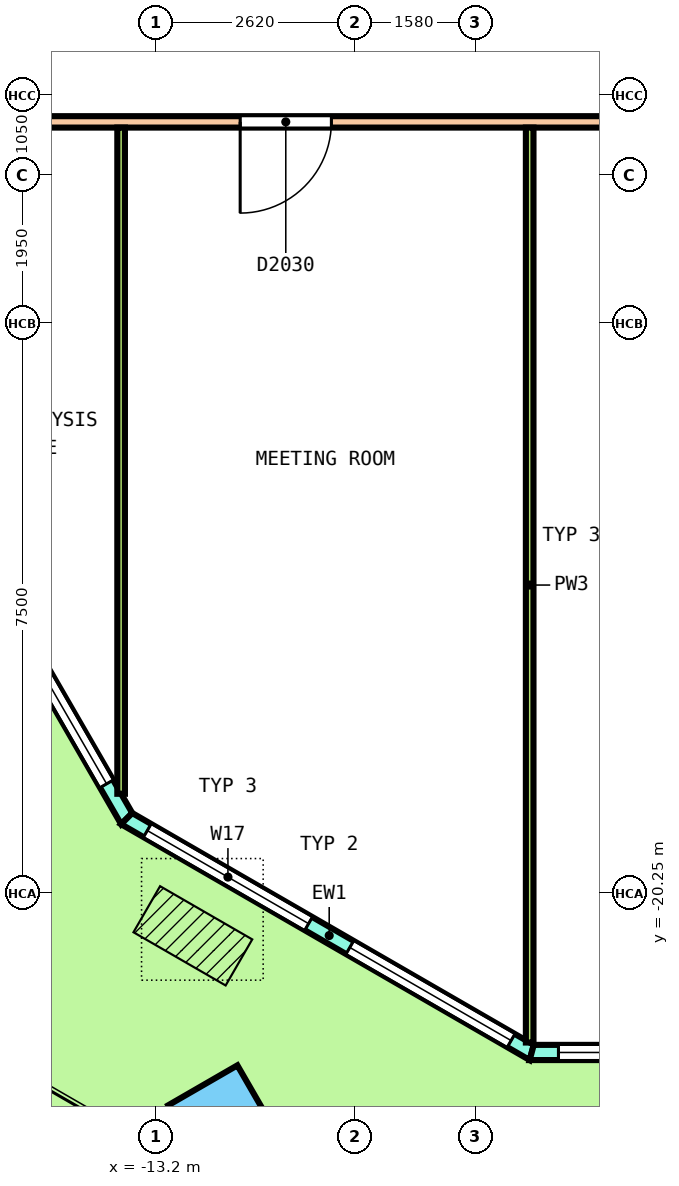
"""IFC4 building model, lengths in metres.
Left out: names, types, materials, properties, quantities, classifications, styles, units other than length and angle.
Written with IfcOpenShell. Run it as: python <this file> out.ifc"""

import sys

from ifc_helpers import new_model, si_unit, direction, frame, frame_2d, origin, origin_2d, place, context, subcontext, project, spatial, polyline, rectangle, outline, extrude, element, fill, save


model = new_model("IFC4")
c1 = context("Model", 3, precision=1e-05, world=origin(), true_north=direction((0.0, 1.0)))
c2 = subcontext(c1, "Body", "Model", "MODEL_VIEW")
j1 = project(units=[si_unit("LENGTHUNIT", "METRE"), si_unit("PLANEANGLEUNIT", "RADIAN")], contexts=[c1])
p1 = place(None, origin())
s1 = spatial("IfcSite", under=j1, at=p1, CompositionType="ELEMENT")
p2 = place(p1, origin())
s2 = spatial("IfcBuilding", under=s1, at=p2, CompositionType="ELEMENT")
p3 = place(p2, frame((0.0, 0.0, 241.4)))
s3 = spatial("IfcBuildingStorey", under=s2, at=p3, CompositionType="ELEMENT", Elevation=241.4)
p4 = place(p3, frame((-12.323, -23.229, 0.0), z_axis=(0.018180813073, -0.031348534306, 0.999343147989), x_axis=(0.866776681622, -0.497708117994, -0.031381737993)))
e1 = element("IfcColumn", 1, at=p4, inside=s3, PredefinedType="COLUMN", context=c2, shape_type="SweptSolid", body=[
    extrude(rectangle(XDim=1.05, YDim=1.05, at=origin_2d()), origin(), (0.0, 0.0, 1.0), 3.653),
])
p5 = place(p3, frame((-23.479, -2.134, 0.0), z_axis=(0.0, 0.0, 1.0), x_axis=(0.500004117472, -0.866023026548, 0.0)))
e2 = element("IfcWall", 2, at=p5, inside=s3, PredefinedType="SOLIDWALL", context=c2, shape_type="SweptSolid", body=[
    extrude(outline(polyline([(-0.027, -0.1), (1.017, -0.1), (2.061, -0.1), (3.105, -0.1), (4.149, -0.1), (5.193, -0.1), (6.237, -0.1), (7.281, -0.1), (8.325, -0.1), (9.369, -0.1), (10.414, -0.1), (11.458, -0.1), (12.501, -0.1), (13.546, -0.1), (14.59, -0.1), (15.634, -0.1), (16.678, -0.1), (17.722, -0.1), (18.766, -0.1), (19.81, -0.1), (19.756, 0.1), (18.718, 0.1), (17.679, 0.1), (16.641, 0.1), (15.603, 0.1), (14.564, 0.1), (13.526, 0.1), (12.488, 0.1), (11.449, 0.1), (10.411, 0.1), (9.372, 0.1), (8.334, 0.1), (7.295, 0.1), (6.257, 0.1), (5.219, 0.1), (4.18, 0.1), (3.142, 0.1), (2.104, 0.1), (1.065, 0.1), (0.027, 0.1), (-0.027, -0.1)])), origin(), (0.0, 0.0, 1.0), 3.7),
])
p6 = place(p5, frame((0.528, 0.0, 0.1)))
e3 = element("IfcOpeningElement", 3, at=p6, cuts=e2, PredefinedType="OPENING", context=c2, shape_type="SweptSolid", body=[
    extrude(rectangle(XDim=2.9, YDim=2.65, at=frame_2d((1.45, 1.325))), frame((0.0, 0.11, 0.0), z_axis=(0.0, -1.0, 0.0), x_axis=(1.0, 0.0, 0.0)), (0.0, 0.0, 1.0), 0.22),
])
p7 = place(p5, frame((4.485, 0.0, 0.1)))
e4 = element("IfcOpeningElement", 4, at=p7, cuts=e2, PredefinedType="OPENING", context=c2, shape_type="SweptSolid", body=[
    extrude(rectangle(XDim=2.9, YDim=2.65, at=frame_2d((1.45, 1.325))), frame((0.0, 0.11, 0.0), z_axis=(0.0, -1.0, 0.0), x_axis=(1.0, 0.0, 0.0)), (0.0, 0.0, 1.0), 0.22),
])
p8 = place(p5, frame((8.991, 0.0, 0.0)))
e5 = element("IfcOpeningElement", 5, at=p8, cuts=e2, PredefinedType="OPENING", context=c2, shape_type="SweptSolid", body=[
    extrude(rectangle(XDim=1.8, YDim=2.4, at=frame_2d((0.9, 1.2))), frame((0.0, 0.11, 0.0), z_axis=(0.0, -1.0, 0.0), x_axis=(1.0, 0.0, 0.0)), (0.0, 0.0, 1.0), 0.22),
])
p9 = place(p5, frame((8.991, 0.0, 2.55)))
e6 = element("IfcOpeningElement", 6, at=p9, cuts=e2, PredefinedType="OPENING", context=c2, shape_type="SweptSolid", body=[
    extrude(rectangle(XDim=1.8, YDim=0.2, at=frame_2d((0.9, 0.1))), frame((0.0, 0.11, 0.0), z_axis=(0.0, -1.0, 0.0), x_axis=(1.0, 0.0, 0.0)), (0.0, 0.0, 1.0), 0.22),
])
p10 = place(p5, frame((12.398, 0.0, 0.1)))
e7 = element("IfcOpeningElement", 7, at=p10, cuts=e2, PredefinedType="OPENING", context=c2, shape_type="SweptSolid", body=[
    extrude(rectangle(XDim=2.9, YDim=2.65, at=frame_2d((1.45, 1.325))), frame((0.0, 0.11, 0.0), z_axis=(0.0, -1.0, 0.0), x_axis=(1.0, 0.0, 0.0)), (0.0, 0.0, 1.0), 0.22),
])
p11 = place(p5, frame((16.355, 0.0, 0.1)))
e8 = element("IfcOpeningElement", 8, at=p11, cuts=e2, PredefinedType="OPENING", context=c2, shape_type="SweptSolid", body=[
    extrude(rectangle(XDim=2.9, YDim=2.65, at=frame_2d((1.45, 1.325))), frame((0.0, 0.11, 0.0), z_axis=(0.0, -1.0, 0.0), x_axis=(1.0, 0.0, 0.0)), (0.0, 0.0, 1.0), 0.22),
])
p12 = place(p3, frame((-13.587, -19.266, 0.0), z_axis=(0.0, 0.0, 1.0), x_axis=(0.866029647142, -0.499992650217, 0.0)))
e9 = element("IfcWall", 9, at=p12, inside=s3, PredefinedType="SOLIDWALL", context=c2, shape_type="SweptSolid", body=[
    extrude(outline(polyline([(-0.027, -0.1), (1.008, -0.1), (2.042, -0.1), (3.076, -0.1), (4.111, -0.1), (5.145, -0.1), (6.18, -0.1), (6.126, 0.1), (5.109, 0.1), (4.093, 0.1), (3.076, 0.1), (2.06, 0.1), (1.043, 0.1), (0.027, 0.1), (-0.027, -0.1)])), origin(), (0.0, 0.0, 1.0), 3.7),
])
p13 = place(p12, frame((0.313, 0.0, 0.1)))
e10 = element("IfcOpeningElement", 10, at=p13, cuts=e9, PredefinedType="OPENING", context=c2, shape_type="SweptSolid", body=[
    extrude(rectangle(XDim=2.45, YDim=2.65, at=frame_2d((1.225, 1.325))), frame((0.0, 0.11, 0.0), z_axis=(0.0, -1.0, 0.0), x_axis=(1.0, 0.0, 0.0)), (0.0, 0.0, 1.0), 0.22),
])
p14 = place(p12, frame((3.39, 0.0, 0.1)))
e11 = element("IfcOpeningElement", 11, at=p14, cuts=e9, PredefinedType="OPENING", context=c2, shape_type="SweptSolid", body=[
    extrude(rectangle(XDim=2.45, YDim=2.65, at=frame_2d((1.225, 1.325))), frame((0.0, 0.11, 0.0), z_axis=(0.0, -1.0, 0.0), x_axis=(1.0, 0.0, 0.0)), (0.0, 0.0, 1.0), 0.22),
])
p15 = place(p3, frame((-8.259, -22.343, 0.0), z_axis=(0.0, 0.0, 1.0), x_axis=(1.0, 0.0, 0.0)))
e12 = element("IfcWall", 12, at=p15, inside=s3, PredefinedType="SOLIDWALL", context=c2, shape_type="SweptSolid", body=[
    extrude(outline(polyline([(-0.027, -0.1), (1.009, -0.1), (2.044, -0.1), (3.08, -0.1), (4.116, -0.1), (5.152, -0.1), (6.187, -0.1), (7.223, -0.1), (8.259, -0.1), (9.294, -0.1), (10.33, -0.1), (11.365, -0.1), (12.401, -0.1), (13.437, -0.1), (14.473, -0.1), (15.508, -0.1), (16.544, -0.1), (16.49, 0.1), (15.461, 0.1), (14.432, 0.1), (13.403, 0.1), (12.375, 0.1), (11.345, 0.1), (10.316, 0.1), (9.288, 0.1), (8.259, 0.1), (7.229, 0.1), (6.201, 0.1), (5.172, 0.1), (4.143, 0.1), (3.114, 0.1), (2.085, 0.1), (1.056, 0.1), (0.027, 0.1), (-0.027, -0.1)])), origin(), (0.0, 0.0, 1.0), 3.7),
])
p16 = place(p15, frame((0.352, 0.0, 0.1)))
e13 = element("IfcOpeningElement", 13, at=p16, cuts=e12, PredefinedType="OPENING", context=c2, shape_type="SweptSolid", body=[
    extrude(rectangle(XDim=2.6, YDim=2.65, at=frame_2d((1.3, 1.325))), frame((0.0, 0.11, 0.0), z_axis=(0.0, -1.0, 0.0), x_axis=(1.0, 0.0, 0.0)), (0.0, 0.0, 1.0), 0.22),
])
p17 = place(p15, frame((3.655, 0.0, 0.1)))
e14 = element("IfcOpeningElement", 14, at=p17, cuts=e12, PredefinedType="OPENING", context=c2, shape_type="SweptSolid", body=[
    extrude(rectangle(XDim=2.6, YDim=2.65, at=frame_2d((1.3, 1.325))), frame((0.0, 0.11, 0.0), z_axis=(0.0, -1.0, 0.0), x_axis=(1.0, 0.0, 0.0)), (0.0, 0.0, 1.0), 0.22),
])
p18 = place(p15, frame((7.359, 0.0, 0.0)))
e15 = element("IfcOpeningElement", 15, at=p18, cuts=e12, PredefinedType="OPENING", context=c2, shape_type="SweptSolid", body=[
    extrude(rectangle(XDim=1.8, YDim=2.4, at=frame_2d((0.9, 1.2))), frame((0.0, 0.11, 0.0), z_axis=(0.0, -1.0, 0.0), x_axis=(1.0, 0.0, 0.0)), (0.0, 0.0, 1.0), 0.22),
])
p19 = place(p15, frame((7.359, 0.0, 2.55)))
e16 = element("IfcOpeningElement", 16, at=p19, cuts=e12, PredefinedType="OPENING", context=c2, shape_type="SweptSolid", body=[
    extrude(rectangle(XDim=1.8, YDim=0.2, at=frame_2d((0.9, 0.1))), frame((0.0, 0.11, 0.0), z_axis=(0.0, -1.0, 0.0), x_axis=(1.0, 0.0, 0.0)), (0.0, 0.0, 1.0), 0.22),
])
p20 = place(p15, frame((10.262, 0.0, 0.1)))
e17 = element("IfcOpeningElement", 17, at=p20, cuts=e12, PredefinedType="OPENING", context=c2, shape_type="SweptSolid", body=[
    extrude(rectangle(XDim=2.6, YDim=2.65, at=frame_2d((1.3, 1.325))), frame((0.0, 0.11, 0.0), z_axis=(0.0, -1.0, 0.0), x_axis=(1.0, 0.0, 0.0)), (0.0, 0.0, 1.0), 0.22),
])
p21 = place(p15, frame((13.565, 0.0, 0.1)))
e18 = element("IfcOpeningElement", 18, at=p21, cuts=e12, PredefinedType="OPENING", context=c2, shape_type="SweptSolid", body=[
    extrude(rectangle(XDim=2.6, YDim=2.65, at=frame_2d((1.3, 1.325))), frame((0.0, 0.11, 0.0), z_axis=(0.0, -1.0, 0.0), x_axis=(1.0, 0.0, 0.0)), (0.0, 0.0, 1.0), 0.22),
])
p22 = place(p3, frame((-15.275, -10.1, 0.0), z_axis=(0.0, 0.0, 1.0), x_axis=(1.0, 0.0, 0.0)))
e19 = element("IfcWall", 19, at=p22, inside=s3, PredefinedType="PARTITIONING", context=c2, shape_type="SweptSolid", body=[
    extrude(rectangle(XDim=30.55, YDim=0.15, at=frame_2d((15.275, 0.0))), origin(), (0.0, 0.0, 1.0), 2.8),
])
p23 = place(p22, frame((3.181, 0.0, 0.0)))
e20 = element("IfcOpeningElement", 20, at=p23, cuts=e19, PredefinedType="OPENING", context=c2, shape_type="SweptSolid", body=[
    extrude(rectangle(XDim=1.2, YDim=2.1, at=frame_2d((0.6, 1.05))), frame((0.0, 0.085, 0.0), z_axis=(0.0, -1.0, 0.0), x_axis=(1.0, 0.0, 0.0)), (0.0, 0.0, 1.0), 0.17),
])
p24 = place(p22, frame((8.522, 0.0, 0.0)))
e21 = element("IfcOpeningElement", 21, at=p24, cuts=e19, PredefinedType="OPENING", context=c2, shape_type="SweptSolid", body=[
    extrude(rectangle(XDim=1.2, YDim=2.1, at=frame_2d((0.6, 1.05))), frame((0.0, 0.085, 0.0), z_axis=(0.0, -1.0, 0.0), x_axis=(1.0, 0.0, 0.0)), (0.0, 0.0, 1.0), 0.17),
])
p25 = place(p22, frame((15.2, 0.0, 0.0)))
e22 = element("IfcOpeningElement", 22, at=p25, cuts=e19, PredefinedType="OPENING", context=c2, shape_type="SweptSolid", body=[
    extrude(rectangle(XDim=1.0, YDim=2.1, at=frame_2d((0.5, 1.05))), frame((0.0, 0.085, 0.0), z_axis=(0.0, -1.0, 0.0), x_axis=(1.0, 0.0, 0.0)), (0.0, 0.0, 1.0), 0.17),
])
p26 = place(p22, frame((23.262, 0.0, 0.0)))
e23 = element("IfcOpeningElement", 23, at=p26, cuts=e19, PredefinedType="OPENING", context=c2, shape_type="SweptSolid", body=[
    extrude(rectangle(XDim=1.2, YDim=2.1, at=frame_2d((0.6, 1.05))), frame((0.0, 0.085, 0.0), z_axis=(0.0, -1.0, 0.0), x_axis=(1.0, 0.0, 0.0)), (0.0, 0.0, 1.0), 0.17),
])
p27 = place(p22, frame((28.493, 0.0, 0.0)))
e24 = element("IfcOpeningElement", 24, at=p27, cuts=e19, PredefinedType="OPENING", context=c2, shape_type="SweptSolid", body=[
    extrude(rectangle(XDim=1.0, YDim=2.1, at=frame_2d((0.5, 1.05))), frame((0.0, 0.085, 0.0), z_axis=(0.0, -1.0, 0.0), x_axis=(1.0, 0.0, 0.0)), (0.0, 0.0, 1.0), 0.17),
])
p28 = place(p3, frame((-13.66, -18.939, 0.0), z_axis=(0.0, 0.0, 1.0), x_axis=(0.0, 1.0, 0.0)))
e25 = element("IfcWall", 25, at=p28, inside=s3, PredefinedType="PARTITIONING", context=c2, shape_type="SweptSolid", body=[
    extrude(rectangle(XDim=8.764, YDim=0.1, at=frame_2d((4.382, 0.0))), origin(), (0.0, 0.0, 1.0), 2.8),
])
p29 = place(p3, frame((-8.285, -22.212, 0.0), z_axis=(0.0, 0.0, 1.0), x_axis=(0.0, 1.0, 0.0)))
e26 = element("IfcWall", 26, at=p29, inside=s3, PredefinedType="PARTITIONING", context=c2, shape_type="SweptSolid", body=[
    extrude(rectangle(XDim=12.037, YDim=0.1, at=frame_2d((6.019, 0.0))), origin(), (0.0, 0.0, 1.0), 2.8),
])
p30 = place(p11, origin())
e27 = element("IfcWindow", 27, at=p30, inside=s3, PartitioningType="SINGLE_PANEL", PredefinedType="WINDOW", context=c2, shape_type="SweptSolid", body=[
    extrude(rectangle(XDim=2.9, YDim=2.65, at=frame_2d((1.45, 1.325))), frame((0.0, 0.03, 0.0), z_axis=(0.0, -1.0, 0.0), x_axis=(1.0, 0.0, 0.0)), (0.0, 0.0, 1.0), 0.06),
])
fill(e8, e27)
p31 = place(p13, origin())
e28 = element("IfcWindow", 28, at=p31, inside=s3, PartitioningType="SINGLE_PANEL", PredefinedType="WINDOW", context=c2, shape_type="SweptSolid", body=[
    extrude(rectangle(XDim=2.45, YDim=2.65, at=frame_2d((1.225, 1.325))), frame((0.0, 0.03, 0.0), z_axis=(0.0, -1.0, 0.0), x_axis=(1.0, 0.0, 0.0)), (0.0, 0.0, 1.0), 0.06),
])
fill(e10, e28)
p32 = place(p14, origin())
e29 = element("IfcWindow", 29, at=p32, inside=s3, PartitioningType="SINGLE_PANEL", PredefinedType="WINDOW", context=c2, shape_type="SweptSolid", body=[
    extrude(rectangle(XDim=2.45, YDim=2.65, at=frame_2d((1.225, 1.325))), frame((0.0, 0.03, 0.0), z_axis=(0.0, -1.0, 0.0), x_axis=(1.0, 0.0, 0.0)), (0.0, 0.0, 1.0), 0.06),
])
fill(e11, e29)
p33 = place(p16, origin())
e30 = element("IfcWindow", 30, at=p33, inside=s3, PartitioningType="SINGLE_PANEL", PredefinedType="WINDOW", context=c2, shape_type="SweptSolid", body=[
    extrude(rectangle(XDim=2.6, YDim=2.65, at=frame_2d((1.3, 1.325))), frame((0.0, 0.03, 0.0), z_axis=(0.0, -1.0, 0.0), x_axis=(1.0, 0.0, 0.0)), (0.0, 0.0, 1.0), 0.06),
])
fill(e13, e30)
p34 = place(p23, origin())
e31 = element("IfcDoor", 31, at=p34, inside=s3, OperationType="DOUBLE_DOOR_SINGLE_SWING", PredefinedType="DOOR", context=c2, shape_type="SweptSolid", body=[
    extrude(rectangle(XDim=1.2, YDim=2.1, at=frame_2d((0.6, 1.05))), frame((0.0, 0.025, 0.0), z_axis=(0.0, -1.0, 0.0), x_axis=(1.0, 0.0, 0.0)), (0.0, 0.0, 1.0), 0.05),
])
fill(e20, e31)
save(model, sys.argv[1])
